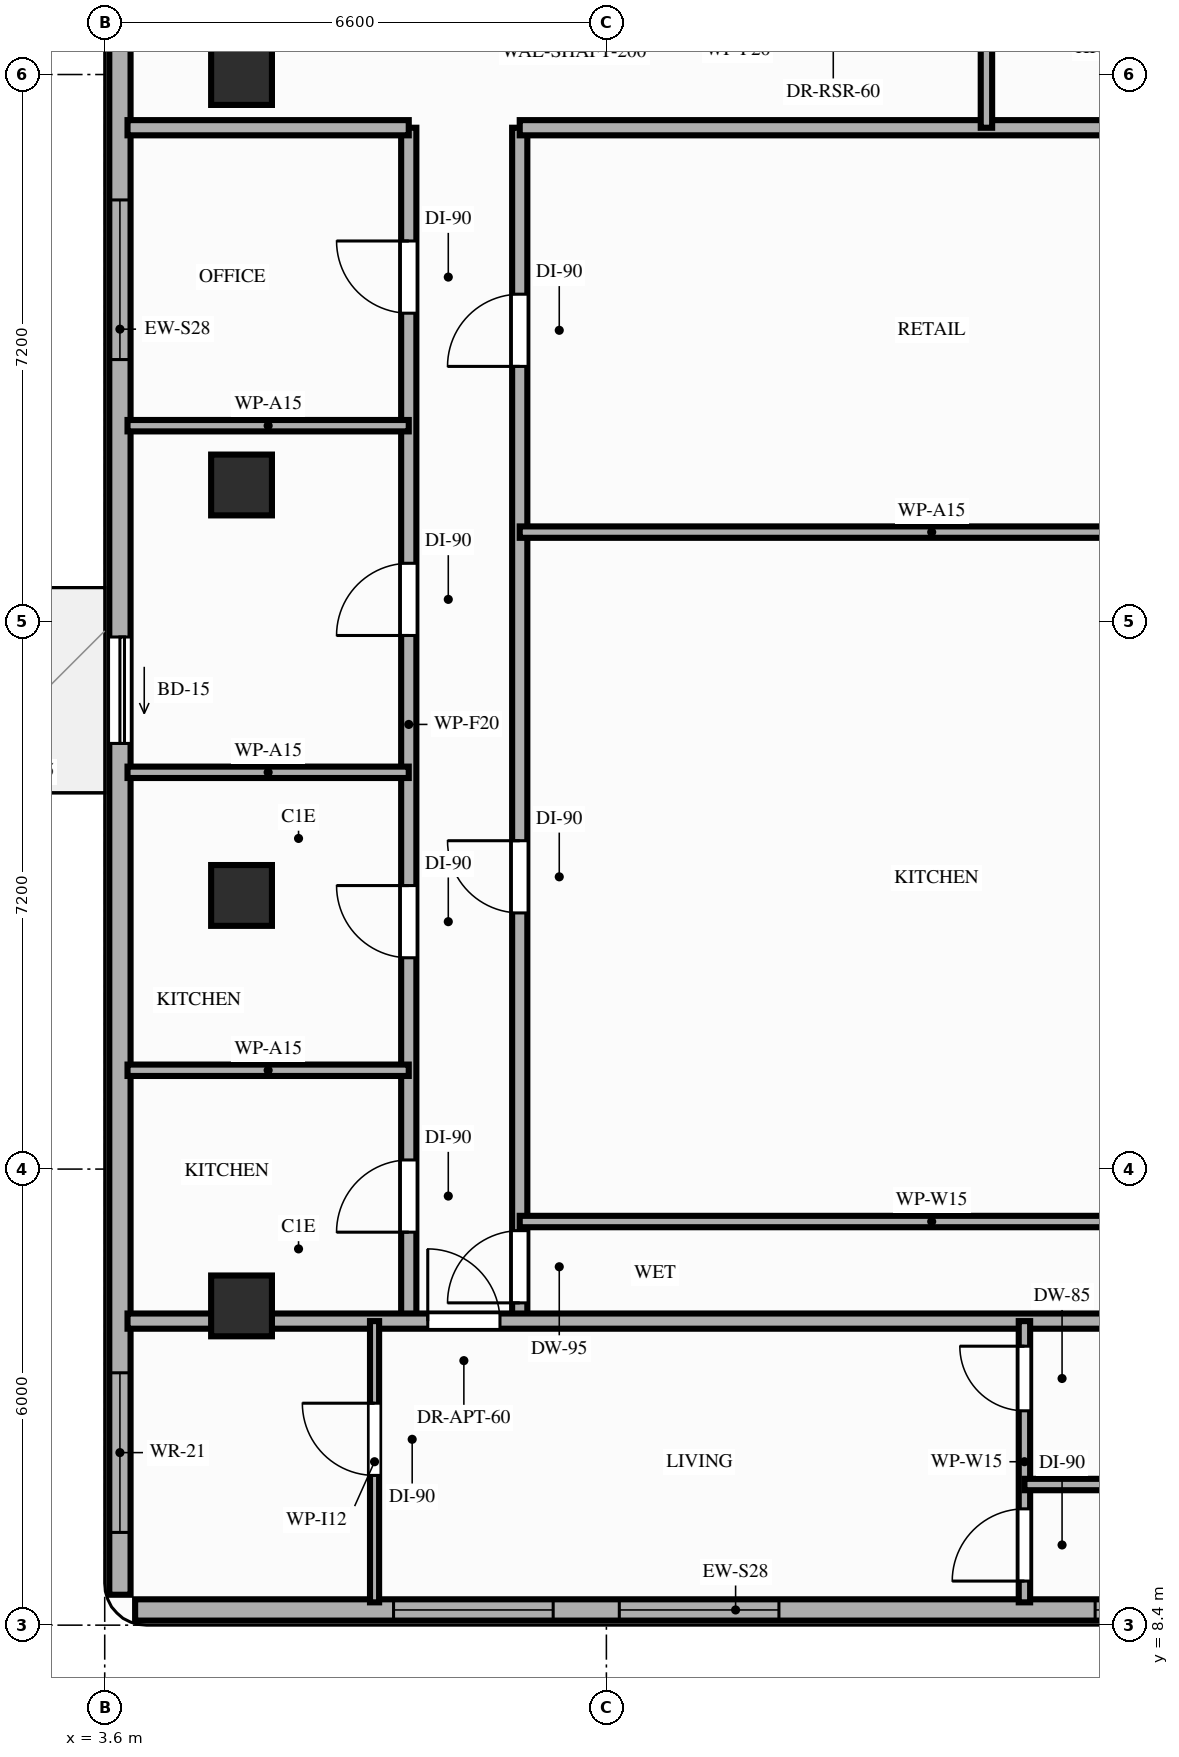
"""IFC4 building model, lengths in metres.
Left out: names, types, materials, properties, quantities, classifications, styles, units other than length and angle.
Written with IfcOpenShell. Run it as: python <this file> out.ifc"""

import sys

from ifc_helpers import new_model, si_unit, direction, frame, frame_2d, origin, origin_2d, place, context, subcontext, project, spatial, rectangle, extrude, element, fill, save


model = new_model("IFC4")
c1 = context("Model", 3, precision=1e-05, world=origin(), true_north=direction((0.0, 1.0)))
c2 = subcontext(c1, "Body", "Model", "MODEL_VIEW")
j1 = project(units=[si_unit("LENGTHUNIT", "METRE"), si_unit("PLANEANGLEUNIT", "RADIAN")], contexts=[c1])
p1 = place(None, origin())
s1 = spatial("IfcSite", under=j1, at=p1, CompositionType="ELEMENT")
p2 = place(p1, origin())
s2 = spatial("IfcBuilding", under=s1, at=p2, CompositionType="ELEMENT")
p3 = place(p2, frame((0.0, 0.0, 218.4)))
s3 = spatial("IfcBuildingStorey", under=s2, at=p3, CompositionType="ELEMENT", Elevation=218.4)
for number, where, z_axis, x_axis in (
    (1, (5.4, 12.6, 0.0), (0.0, 0.0, 1.0), (1.0, 0.0, 0.0)),
    (2, (5.4, 18.0, 0.0), (0.0, 0.0, 1.0), (1.0, 0.0, 0.0)),
    (3, (5.4, 23.4, 0.0), (0.0, 0.0, 1.0), (1.0, 0.0, 0.0)),
    (4, (5.4, 28.8, 0.0), (0.0, 0.0, 1.0), (1.0, 0.0, 0.0)),
):
    element("IfcColumn", number, at=place(p3, frame(where, z_axis=z_axis, x_axis=x_axis)), inside=s3, PredefinedType="COLUMN", context=c2, shape_type="SweptSolid", body=[
        extrude(rectangle(XDim=0.8, YDim=0.8, at=origin_2d()), origin(), (0.0, 0.0, 1.0), 3.2),
    ])
p4 = place(p3, frame((4.0, 8.6, 0.0), z_axis=(0.0, 0.0, 1.0), x_axis=(1.0, 0.0, 0.0)))
e5 = element("IfcWall", 5, at=p4, inside=s3, PredefinedType="STANDARD", context=c2, shape_type="SweptSolid", body=[
    extrude(rectangle(XDim=15.8, YDim=0.28, at=frame_2d((7.9, 0.0))), origin(), (0.0, 0.0, 1.0), 3.02),
])
p5 = place(p4, frame((6.37, 0.0, 0.85)))
e6 = element("IfcOpeningElement", 6, at=p5, cuts=e5, PredefinedType="OPENING", context=c2, shape_type="SweptSolid", body=[
    extrude(rectangle(XDim=2.1, YDim=1.8, at=frame_2d((1.05, 0.9))), frame((0.0, 0.15, 0.0), z_axis=(0.0, -1.0, 0.0), x_axis=(1.0, 0.0, 0.0)), (0.0, 0.0, 1.0), 0.3),
])
p6 = place(p4, frame((12.63, 0.0, 0.85)))
e7 = element("IfcOpeningElement", 7, at=p6, cuts=e5, PredefinedType="OPENING", context=c2, shape_type="SweptSolid", body=[
    extrude(rectangle(XDim=2.1, YDim=1.8, at=frame_2d((1.05, 0.9))), frame((0.0, 0.15, 0.0), z_axis=(0.0, -1.0, 0.0), x_axis=(1.0, 0.0, 0.0)), (0.0, 0.0, 1.0), 0.3),
])
p7 = place(p4, frame((3.4, 0.0, 0.85)))
e8 = element("IfcOpeningElement", 8, at=p7, cuts=e5, PredefinedType="OPENING", context=c2, shape_type="SweptSolid", body=[
    extrude(rectangle(XDim=2.1, YDim=1.8, at=frame_2d((1.05, 0.9))), frame((0.0, 0.15, 0.0), z_axis=(0.0, -1.0, 0.0), x_axis=(1.0, 0.0, 0.0)), (0.0, 0.0, 1.0), 0.3),
])
p8 = place(p3, frame((3.8, 42.1, 0.0), z_axis=(0.0, 0.0, 1.0), x_axis=(0.0, -1.0, 0.0)))
e9 = element("IfcWall", 9, at=p8, inside=s3, PredefinedType="STANDARD", context=c2, shape_type="SweptSolid", body=[
    extrude(rectangle(XDim=33.3, YDim=0.28, at=frame_2d((16.65, 0.0))), origin(), (0.0, 0.0, 1.0), 2.71),
])
p9 = place(p8, frame((20.7, 0.0, 0.0)))
e10 = element("IfcOpeningElement", 10, at=p9, cuts=e9, PredefinedType="OPENING", context=c2, shape_type="SweptSolid", body=[
    extrude(rectangle(XDim=1.4, YDim=2.1, at=frame_2d((0.7, 1.05))), frame((0.0, 0.15, 0.0), z_axis=(0.0, -1.0, 0.0), x_axis=(1.0, 0.0, 0.0)), (0.0, 0.0, 1.0), 0.3),
])
p10 = place(p8, frame((30.38, 0.0, 0.85)))
e11 = element("IfcOpeningElement", 11, at=p10, cuts=e9, PredefinedType="OPENING", context=c2, shape_type="SweptSolid", body=[
    extrude(rectangle(XDim=2.1, YDim=1.61, at=frame_2d((1.05, 0.805))), frame((0.0, 0.15, 0.0), z_axis=(0.0, -1.0, 0.0), x_axis=(1.0, 0.0, 0.0)), (0.0, 0.0, 1.0), 0.3),
])
p11 = place(p8, frame((14.95, 0.0, 0.85)))
e12 = element("IfcOpeningElement", 12, at=p11, cuts=e9, PredefinedType="OPENING", context=c2, shape_type="SweptSolid", body=[
    extrude(rectangle(XDim=2.1, YDim=1.61, at=frame_2d((1.05, 0.805))), frame((0.0, 0.15, 0.0), z_axis=(0.0, -1.0, 0.0), x_axis=(1.0, 0.0, 0.0)), (0.0, 0.0, 1.0), 0.3),
])
p12 = place(p8, frame((9.75, 0.0, 0.85)))
e13 = element("IfcOpeningElement", 13, at=p12, cuts=e9, PredefinedType="OPENING", context=c2, shape_type="SweptSolid", body=[
    extrude(rectangle(XDim=2.1, YDim=1.61, at=frame_2d((1.05, 0.805))), frame((0.0, 0.15, 0.0), z_axis=(0.0, -1.0, 0.0), x_axis=(1.0, 0.0, 0.0)), (0.0, 0.0, 1.0), 0.3),
])
p13 = place(p8, frame((3.65, 0.0, 0.85)))
e14 = element("IfcOpeningElement", 14, at=p13, cuts=e9, PredefinedType="OPENING", context=c2, shape_type="SweptSolid", body=[
    extrude(rectangle(XDim=2.1, YDim=1.61, at=frame_2d((1.05, 0.805))), frame((0.0, 0.15, 0.0), z_axis=(0.0, -1.0, 0.0), x_axis=(1.0, 0.0, 0.0)), (0.0, 0.0, 1.0), 0.3),
])
p14 = place(p3, frame((7.6, 12.4, 0.0), z_axis=(0.0, 0.0, 1.0), x_axis=(0.0, 1.0, 0.0)))
e15 = element("IfcWall", 15, at=p14, inside=s3, PredefinedType="PARTITIONING", context=c2, shape_type="SweptSolid", body=[
    extrude(rectangle(XDim=15.7, YDim=0.2, at=frame_2d((7.85, 0.0))), origin(), (0.0, 0.0, 1.0), 2.51),
])
p15 = place(p14, frame((1.17, 0.0, 0.0)))
e16 = element("IfcOpeningElement", 16, at=p15, cuts=e15, PredefinedType="OPENING", context=c2, shape_type="SweptSolid", body=[
    extrude(rectangle(XDim=0.95, YDim=2.15, at=frame_2d((0.475, 1.075))), frame((0.0, 0.11, 0.0), z_axis=(0.0, -1.0, 0.0), x_axis=(1.0, 0.0, 0.0)), (0.0, 0.0, 1.0), 0.22),
])
p16 = place(p14, frame((4.78, 0.0, 0.0)))
e17 = element("IfcOpeningElement", 17, at=p16, cuts=e15, PredefinedType="OPENING", context=c2, shape_type="SweptSolid", body=[
    extrude(rectangle(XDim=0.95, YDim=2.15, at=frame_2d((0.475, 1.075))), frame((0.0, 0.11, 0.0), z_axis=(0.0, -1.0, 0.0), x_axis=(1.0, 0.0, 0.0)), (0.0, 0.0, 1.0), 0.22),
])
p17 = place(p14, frame((9.02, 0.0, 0.0)))
e18 = element("IfcOpeningElement", 18, at=p17, cuts=e15, PredefinedType="OPENING", context=c2, shape_type="SweptSolid", body=[
    extrude(rectangle(XDim=0.95, YDim=2.15, at=frame_2d((0.475, 1.075))), frame((0.0, 0.11, 0.0), z_axis=(0.0, -1.0, 0.0), x_axis=(1.0, 0.0, 0.0)), (0.0, 0.0, 1.0), 0.22),
])
p18 = place(p14, frame((13.26, 0.0, 0.0)))
e19 = element("IfcOpeningElement", 19, at=p18, cuts=e15, PredefinedType="OPENING", context=c2, shape_type="SweptSolid", body=[
    extrude(rectangle(XDim=0.95, YDim=2.15, at=frame_2d((0.475, 1.075))), frame((0.0, 0.11, 0.0), z_axis=(0.0, -1.0, 0.0), x_axis=(1.0, 0.0, 0.0)), (0.0, 0.0, 1.0), 0.22),
])
p19 = place(p3, frame((9.06, 12.4, 0.0), z_axis=(0.0, 0.0, 1.0), x_axis=(0.0, 1.0, 0.0)))
e20 = element("IfcWall", 20, at=p19, inside=s3, PredefinedType="PARTITIONING", context=c2, shape_type="SweptSolid", body=[
    extrude(rectangle(XDim=15.7, YDim=0.2, at=frame_2d((7.85, 0.0))), origin(), (0.0, 0.0, 1.0), 2.51),
])
p20 = place(p19, frame((0.24, 0.0, 0.0)))
e21 = element("IfcOpeningElement", 21, at=p20, cuts=e20, PredefinedType="OPENING", context=c2, shape_type="SweptSolid", body=[
    extrude(rectangle(XDim=0.95, YDim=2.1, at=frame_2d((0.475, 1.05))), frame((0.0, 0.11, 0.0), z_axis=(0.0, -1.0, 0.0), x_axis=(1.0, 0.0, 0.0)), (0.0, 0.0, 1.0), 0.22),
])
p21 = place(p19, frame((5.37, 0.0, 0.0)))
e22 = element("IfcOpeningElement", 22, at=p21, cuts=e20, PredefinedType="OPENING", context=c2, shape_type="SweptSolid", body=[
    extrude(rectangle(XDim=0.95, YDim=2.15, at=frame_2d((0.475, 1.075))), frame((0.0, 0.11, 0.0), z_axis=(0.0, -1.0, 0.0), x_axis=(1.0, 0.0, 0.0)), (0.0, 0.0, 1.0), 0.22),
])
p22 = place(p19, frame((12.56, 0.0, 0.0)))
e23 = element("IfcOpeningElement", 23, at=p22, cuts=e20, PredefinedType="OPENING", context=c2, shape_type="SweptSolid", body=[
    extrude(rectangle(XDim=0.95, YDim=2.15, at=frame_2d((0.475, 1.075))), frame((0.0, 0.11, 0.0), z_axis=(0.0, -1.0, 0.0), x_axis=(1.0, 0.0, 0.0)), (0.0, 0.0, 1.0), 0.22),
])
p23 = place(p3, frame((3.9, 12.4, 0.0), z_axis=(0.0, 0.0, 1.0), x_axis=(1.0, 0.0, 0.0)))
e24 = element("IfcWall", 24, at=p23, inside=s3, PredefinedType="PARTITIONING", context=c2, shape_type="SweptSolid", body=[
    extrude(rectangle(XDim=16.0, YDim=0.2, at=frame_2d((8.0, 0.0))), origin(), (0.0, 0.0, 1.0), 2.51),
])
p24 = place(p23, frame((3.95, 0.0, 0.0)))
e25 = element("IfcOpeningElement", 25, at=p24, cuts=e24, PredefinedType="OPENING", context=c2, shape_type="SweptSolid", body=[
    extrude(rectangle(XDim=0.95, YDim=2.15, at=frame_2d((0.475, 1.075))), frame((0.0, 0.11, 0.0), z_axis=(0.0, -1.0, 0.0), x_axis=(1.0, 0.0, 0.0)), (0.0, 0.0, 1.0), 0.22),
])
p25 = place(p3, frame((3.9, 28.1, 0.0), z_axis=(0.0, 0.0, 1.0), x_axis=(1.0, 0.0, 0.0)))
e26 = element("IfcWall", 26, at=p25, inside=s3, PredefinedType="PARTITIONING", context=c2, shape_type="SweptSolid", body=[
    extrude(rectangle(XDim=3.7, YDim=0.2, at=frame_2d((1.85, 0.0))), origin(), (0.0, 0.0, 1.0), 2.51),
])
p26 = place(p3, frame((9.06, 28.1, 0.0), z_axis=(0.0, 0.0, 1.0), x_axis=(1.0, 0.0, 0.0)))
e27 = element("IfcWall", 27, at=p26, inside=s3, PredefinedType="PARTITIONING", context=c2, shape_type="SweptSolid", body=[
    extrude(rectangle(XDim=10.84, YDim=0.2, at=frame_2d((5.42, 0.0))), origin(), (0.0, 0.0, 1.0), 2.51),
])
p27 = place(p3, frame((15.2, 28.1, 0.0), z_axis=(0.0, 0.0, 1.0), x_axis=(0.0, 1.0, 0.0)))
e28 = element("IfcWall", 28, at=p27, inside=s3, PredefinedType="PARTITIONING", context=c2, shape_type="SweptSolid", body=[
    extrude(rectangle(XDim=3.05, YDim=0.15, at=frame_2d((1.525, 0.0))), origin(), (0.0, 0.0, 1.0), 2.51),
])
p28 = place(p3, frame((7.15, 8.7, 0.0), z_axis=(0.0, 0.0, 1.0), x_axis=(0.0, 1.0, 0.0)))
e29 = element("IfcWall", 29, at=p28, inside=s3, PredefinedType="PARTITIONING", context=c2, shape_type="SweptSolid", body=[
    extrude(rectangle(XDim=3.7, YDim=0.12, at=frame_2d((1.85, 0.0))), origin(), (0.0, 0.0, 1.0), 2.51),
])
p29 = place(p28, frame((1.67, 0.0, 0.0)))
e30 = element("IfcOpeningElement", 30, at=p29, cuts=e29, PredefinedType="OPENING", context=c2, shape_type="SweptSolid", body=[
    extrude(rectangle(XDim=0.95, YDim=2.15, at=frame_2d((0.475, 1.075))), frame((0.0, 0.07, 0.0), z_axis=(0.0, -1.0, 0.0), x_axis=(1.0, 0.0, 0.0)), (0.0, 0.0, 1.0), 0.14),
])
p30 = place(p3, frame((15.7, 8.7, 0.0), z_axis=(0.0, 0.0, 1.0), x_axis=(0.0, 1.0, 0.0)))
e31 = element("IfcWall", 31, at=p30, inside=s3, PredefinedType="PARTITIONING", context=c2, shape_type="SweptSolid", body=[
    extrude(rectangle(XDim=3.7, YDim=0.15, at=frame_2d((1.85, 0.0))), origin(), (0.0, 0.0, 1.0), 2.51),
])
p31 = place(p30, frame((0.28, 0.0, 0.0)))
e32 = element("IfcOpeningElement", 32, at=p31, cuts=e31, PredefinedType="OPENING", context=c2, shape_type="SweptSolid", body=[
    extrude(rectangle(XDim=0.95, YDim=2.15, at=frame_2d((0.475, 1.075))), frame((0.0, 0.085, 0.0), z_axis=(0.0, -1.0, 0.0), x_axis=(1.0, 0.0, 0.0)), (0.0, 0.0, 1.0), 0.17),
])
p32 = place(p30, frame((2.52, 0.0, 0.0)))
e33 = element("IfcOpeningElement", 33, at=p32, cuts=e31, PredefinedType="OPENING", context=c2, shape_type="SweptSolid", body=[
    extrude(rectangle(XDim=0.85, YDim=2.1, at=frame_2d((0.425, 1.05))), frame((0.0, 0.085, 0.0), z_axis=(0.0, -1.0, 0.0), x_axis=(1.0, 0.0, 0.0)), (0.0, 0.0, 1.0), 0.17),
])
p33 = place(p3, frame((15.7, 10.25, 0.0), z_axis=(0.0, 0.0, 1.0), x_axis=(1.0, 0.0, 0.0)))
e34 = element("IfcWall", 34, at=p33, inside=s3, PredefinedType="PARTITIONING", context=c2, shape_type="SweptSolid", body=[
    extrude(rectangle(XDim=4.2, YDim=0.15, at=frame_2d((2.1, 0.0))), origin(), (0.0, 0.0, 1.0), 3.02),
])
for number, where, z_axis, x_axis in (
    (35, (3.9, 15.7, 0.0), (0.0, 0.0, 1.0), (1.0, 0.0, 0.0)),
    (36, (3.9, 19.62, 0.0), (0.0, 0.0, 1.0), (1.0, 0.0, 0.0)),
    (37, (3.9, 24.18, 0.0), (0.0, 0.0, 1.0), (1.0, 0.0, 0.0)),
):
    element("IfcWall", number, at=place(p3, frame(where, z_axis=z_axis, x_axis=x_axis)), inside=s3, PredefinedType="PARTITIONING", context=c2, shape_type="SweptSolid", body=[
        extrude(rectangle(XDim=3.7, YDim=0.15, at=frame_2d((1.85, 0.0))), origin(), (0.0, 0.0, 1.0), 2.51),
    ])
for number, where, z_axis, x_axis in (
    (38, (9.06, 13.71, 0.0), (0.0, 0.0, 1.0), (1.0, 0.0, 0.0)),
    (39, (9.06, 22.78, 0.0), (0.0, 0.0, 1.0), (1.0, 0.0, 0.0)),
):
    element("IfcWall", number, at=place(p3, frame(where, z_axis=z_axis, x_axis=x_axis)), inside=s3, PredefinedType="PARTITIONING", context=c2, shape_type="SweptSolid", body=[
        extrude(rectangle(XDim=10.84, YDim=0.15, at=frame_2d((5.42, 0.0))), origin(), (0.0, 0.0, 1.0), 2.51),
    ])
p34 = place(p9, origin())
e40 = element("IfcDoor", 40, at=p34, inside=s3, OperationType="SLIDING_TO_RIGHT", PredefinedType="DOOR", context=c2, shape_type="SweptSolid", body=[
    extrude(rectangle(XDim=1.4, YDim=2.1, at=frame_2d((0.7, 1.05))), frame((0.0, 0.025, 0.0), z_axis=(0.0, -1.0, 0.0), x_axis=(1.0, 0.0, 0.0)), (0.0, 0.0, 1.0), 0.05),
])
fill(e10, e40)
p35 = place(p10, origin())
e41 = element("IfcWindow", 41, at=p35, inside=s3, PartitioningType="SINGLE_PANEL", PredefinedType="WINDOW", context=c2, shape_type="SweptSolid", body=[
    extrude(rectangle(XDim=2.1, YDim=1.61, at=frame_2d((1.05, 0.805))), frame((0.0, 0.03, 0.0), z_axis=(0.0, -1.0, 0.0), x_axis=(1.0, 0.0, 0.0)), (0.0, 0.0, 1.0), 0.06),
])
fill(e11, e41)
p36 = place(p5, origin())
e42 = element("IfcWindow", 42, at=p36, inside=s3, PartitioningType="SINGLE_PANEL", PredefinedType="WINDOW", context=c2, shape_type="SweptSolid", body=[
    extrude(rectangle(XDim=2.1, YDim=1.8, at=frame_2d((1.05, 0.9))), frame((0.0, 0.03, 0.0), z_axis=(0.0, -1.0, 0.0), x_axis=(1.0, 0.0, 0.0)), (0.0, 0.0, 1.0), 0.06),
])
fill(e6, e42)
p37 = place(p6, origin())
e43 = element("IfcWindow", 43, at=p37, inside=s3, PartitioningType="SINGLE_PANEL", PredefinedType="WINDOW", context=c2, shape_type="SweptSolid", body=[
    extrude(rectangle(XDim=2.1, YDim=1.8, at=frame_2d((1.05, 0.9))), frame((0.0, 0.03, 0.0), z_axis=(0.0, -1.0, 0.0), x_axis=(1.0, 0.0, 0.0)), (0.0, 0.0, 1.0), 0.06),
])
fill(e7, e43)
p38 = place(p11, origin())
e44 = element("IfcWindow", 44, at=p38, inside=s3, PartitioningType="SINGLE_PANEL", PredefinedType="WINDOW", context=c2, shape_type="SweptSolid", body=[
    extrude(rectangle(XDim=2.1, YDim=1.61, at=frame_2d((1.05, 0.805))), frame((0.0, 0.03, 0.0), z_axis=(0.0, -1.0, 0.0), x_axis=(1.0, 0.0, 0.0)), (0.0, 0.0, 1.0), 0.06),
])
fill(e12, e44)
p39 = place(p7, origin())
e45 = element("IfcWindow", 45, at=p39, inside=s3, PartitioningType="SINGLE_PANEL", PredefinedType="WINDOW", context=c2, shape_type="SweptSolid", body=[
    extrude(rectangle(XDim=2.1, YDim=1.8, at=frame_2d((1.05, 0.9))), frame((0.0, 0.03, 0.0), z_axis=(0.0, -1.0, 0.0), x_axis=(1.0, 0.0, 0.0)), (0.0, 0.0, 1.0), 0.06),
])
fill(e8, e45)
p40 = place(p24, origin())
e46 = element("IfcDoor", 46, at=p40, inside=s3, OperationType="SINGLE_SWING_LEFT", PredefinedType="DOOR", context=c2, shape_type="SweptSolid", body=[
    extrude(rectangle(XDim=0.95, YDim=2.15, at=frame_2d((0.475, 1.075))), frame((0.0, 0.025, 0.0), z_axis=(0.0, -1.0, 0.0), x_axis=(1.0, 0.0, 0.0)), (0.0, 0.0, 1.0), 0.05),
])
fill(e25, e46)
p41 = place(p29, origin())
e47 = element("IfcDoor", 47, at=p41, inside=s3, OperationType="SINGLE_SWING_RIGHT", PredefinedType="DOOR", context=c2, shape_type="SweptSolid", body=[
    extrude(rectangle(XDim=0.95, YDim=2.15, at=frame_2d((0.475, 1.075))), frame((0.0, 0.025, 0.0), z_axis=(0.0, -1.0, 0.0), x_axis=(1.0, 0.0, 0.0)), (0.0, 0.0, 1.0), 0.05),
])
fill(e30, e47)
p42 = place(p31, origin())
e48 = element("IfcDoor", 48, at=p42, inside=s3, OperationType="SINGLE_SWING_LEFT", PredefinedType="DOOR", context=c2, shape_type="SweptSolid", body=[
    extrude(rectangle(XDim=0.95, YDim=2.15, at=frame_2d((0.475, 1.075))), frame((0.0, 0.025, 0.0), z_axis=(0.0, -1.0, 0.0), x_axis=(1.0, 0.0, 0.0)), (0.0, 0.0, 1.0), 0.05),
])
fill(e32, e48)
p43 = place(p32, origin())
e49 = element("IfcDoor", 49, at=p43, inside=s3, OperationType="SINGLE_SWING_RIGHT", PredefinedType="DOOR", context=c2, shape_type="SweptSolid", body=[
    extrude(rectangle(XDim=0.85, YDim=2.1, at=frame_2d((0.425, 1.05))), frame((0.0, 0.025, 0.0), z_axis=(0.0, -1.0, 0.0), x_axis=(1.0, 0.0, 0.0)), (0.0, 0.0, 1.0), 0.05),
])
fill(e33, e49)
p44 = place(p15, origin())
e50 = element("IfcDoor", 50, at=p44, inside=s3, OperationType="SINGLE_SWING_LEFT", PredefinedType="DOOR", context=c2, shape_type="SweptSolid", body=[
    extrude(rectangle(XDim=0.95, YDim=2.15, at=frame_2d((0.475, 1.075))), frame((0.0, 0.025, 0.0), z_axis=(0.0, -1.0, 0.0), x_axis=(1.0, 0.0, 0.0)), (0.0, 0.0, 1.0), 0.05),
])
fill(e16, e50)
p45 = place(p16, origin())
e51 = element("IfcDoor", 51, at=p45, inside=s3, OperationType="SINGLE_SWING_RIGHT", PredefinedType="DOOR", context=c2, shape_type="SweptSolid", body=[
    extrude(rectangle(XDim=0.95, YDim=2.15, at=frame_2d((0.475, 1.075))), frame((0.0, 0.025, 0.0), z_axis=(0.0, -1.0, 0.0), x_axis=(1.0, 0.0, 0.0)), (0.0, 0.0, 1.0), 0.05),
])
fill(e17, e51)
p46 = place(p17, origin())
e52 = element("IfcDoor", 52, at=p46, inside=s3, OperationType="SINGLE_SWING_LEFT", PredefinedType="DOOR", context=c2, shape_type="SweptSolid", body=[
    extrude(rectangle(XDim=0.95, YDim=2.15, at=frame_2d((0.475, 1.075))), frame((0.0, 0.025, 0.0), z_axis=(0.0, -1.0, 0.0), x_axis=(1.0, 0.0, 0.0)), (0.0, 0.0, 1.0), 0.05),
])
fill(e18, e52)
p47 = place(p18, origin())
e53 = element("IfcDoor", 53, at=p47, inside=s3, OperationType="SINGLE_SWING_RIGHT", PredefinedType="DOOR", context=c2, shape_type="SweptSolid", body=[
    extrude(rectangle(XDim=0.95, YDim=2.15, at=frame_2d((0.475, 1.075))), frame((0.0, 0.025, 0.0), z_axis=(0.0, -1.0, 0.0), x_axis=(1.0, 0.0, 0.0)), (0.0, 0.0, 1.0), 0.05),
])
fill(e19, e53)
p48 = place(p20, origin())
e54 = element("IfcDoor", 54, at=p48, inside=s3, OperationType="SINGLE_SWING_LEFT", PredefinedType="DOOR", context=c2, shape_type="SweptSolid", body=[
    extrude(rectangle(XDim=0.95, YDim=2.1, at=frame_2d((0.475, 1.05))), frame((0.0, 0.025, 0.0), z_axis=(0.0, -1.0, 0.0), x_axis=(1.0, 0.0, 0.0)), (0.0, 0.0, 1.0), 0.05),
])
fill(e21, e54)
p49 = place(p21, origin())
e55 = element("IfcDoor", 55, at=p49, inside=s3, OperationType="SINGLE_SWING_RIGHT", PredefinedType="DOOR", context=c2, shape_type="SweptSolid", body=[
    extrude(rectangle(XDim=0.95, YDim=2.15, at=frame_2d((0.475, 1.075))), frame((0.0, 0.025, 0.0), z_axis=(0.0, -1.0, 0.0), x_axis=(1.0, 0.0, 0.0)), (0.0, 0.0, 1.0), 0.05),
])
fill(e22, e55)
p50 = place(p22, origin())
e56 = element("IfcDoor", 56, at=p50, inside=s3, OperationType="SINGLE_SWING_LEFT", PredefinedType="DOOR", context=c2, shape_type="SweptSolid", body=[
    extrude(rectangle(XDim=0.95, YDim=2.15, at=frame_2d((0.475, 1.075))), frame((0.0, 0.025, 0.0), z_axis=(0.0, -1.0, 0.0), x_axis=(1.0, 0.0, 0.0)), (0.0, 0.0, 1.0), 0.05),
])
fill(e23, e56)
save(model, sys.argv[1])
